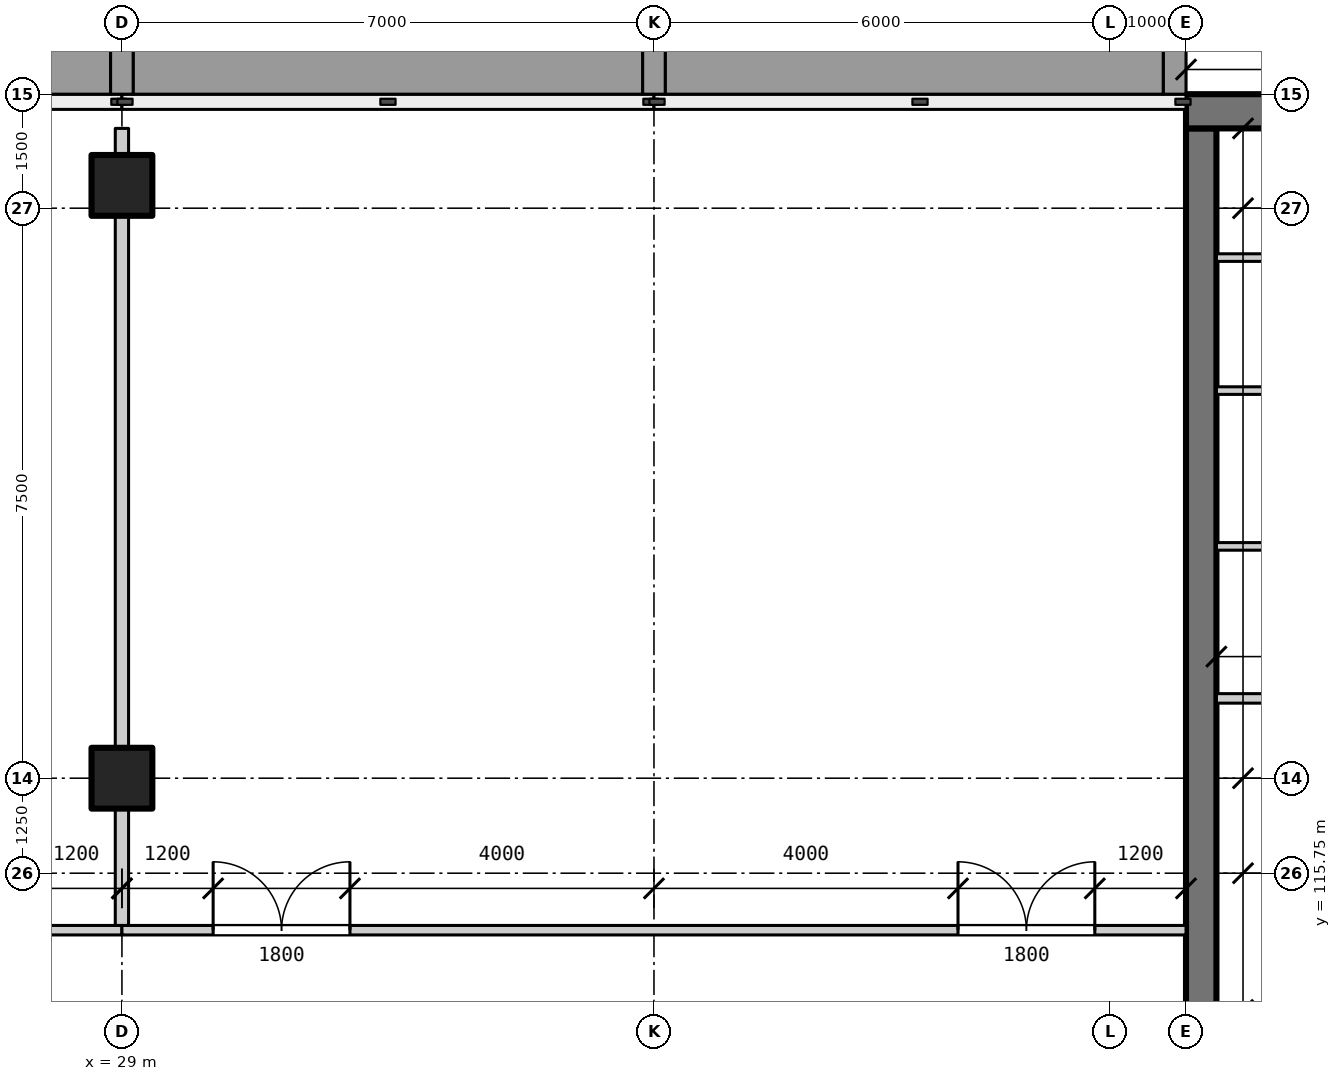
"""IFC4 building model, lengths in metres.
Left out: names, types, materials, properties, quantities, classifications, styles, units other than length and angle.
Written with IfcOpenShell. Run it as: python <this file> out.ifc"""

import sys

from ifc_helpers import new_model, si_unit, direction, frame, frame_2d, origin, origin_2d, place, context, subcontext, project, spatial, rectangle, extrude, element, fill, save


model = new_model("IFC4")
c1 = context("Model", 3, precision=1e-05, world=origin(), true_north=direction((0.0, 1.0)))
c2 = subcontext(c1, "Body", "Model", "MODEL_VIEW")
j1 = project(units=[si_unit("LENGTHUNIT", "METRE"), si_unit("PLANEANGLEUNIT", "RADIAN")], contexts=[c1])
p1 = place(None, origin())
s1 = spatial("IfcSite", under=j1, at=p1, CompositionType="ELEMENT")
p2 = place(p1, origin())
s2 = spatial("IfcBuilding", under=s1, at=p2, CompositionType="ELEMENT")
p3 = place(p2, frame((0.0, 0.0, 6.0)))
s3 = spatial("IfcBuildingStorey", under=s2, at=p3, CompositionType="ELEMENT", Elevation=6.0)
for number, where, z_axis, x_axis in (
    (1, (29.0, 117.0, 0.0), (0.0, 0.0, 1.0), (1.0, 0.0, 0.0)),
    (2, (29.0, 124.8, 0.0), (0.0, 0.0, 1.0), (1.0, 0.0, 0.0)),
):
    element("IfcColumn", number, at=place(p3, frame(where, z_axis=z_axis, x_axis=x_axis)), inside=s3, PredefinedType="COLUMN", context=c2, shape_type="SweptSolid", body=[
        extrude(rectangle(XDim=0.8, YDim=0.8, at=origin_2d()), origin(), (0.0, 0.0, 1.0), 3.9),
    ])
p4 = place(p3, frame((43.2, 99.0, 0.0), z_axis=(0.0, 0.0, 1.0), x_axis=(0.0, 1.0, 0.0)))
e3 = element("IfcWall", 3, at=p4, inside=s3, PredefinedType="SHEAR", context=c2, shape_type="SweptSolid", body=[
    extrude(rectangle(XDim=26.55, YDim=0.4, at=frame_2d((13.275, 0.0))), origin(), (0.0, 0.0, 1.0), 4.2),
])
p5 = place(p4, frame((13.55, 0.0, 0.0)))
e4 = element("IfcOpeningElement", 4, at=p5, cuts=e3, PredefinedType="OPENING", context=c2, shape_type="SweptSolid", body=[
    extrude(rectangle(XDim=1.4, YDim=2.4, at=frame_2d((0.7, 1.2))), frame((0.0, 0.21, 0.0), z_axis=(0.0, -1.0, 0.0), x_axis=(1.0, 0.0, 0.0)), (0.0, 0.0, 1.0), 0.42),
])
p6 = place(p3, frame((43.0, 125.775, 0.0), z_axis=(0.0, 0.0, 1.0), x_axis=(1.0, 0.0, 0.0)))
e5 = element("IfcWall", 5, at=p6, inside=s3, PredefinedType="SOLIDWALL", context=c2, shape_type="SweptSolid", body=[
    extrude(rectangle(XDim=14.55, YDim=0.45, at=frame_2d((7.275, 0.0))), origin(), (0.0, 0.0, 1.0), 3.9),
])
p7 = place(p6, frame((8.35, 0.0, 0.8)))
e6 = element("IfcOpeningElement", 6, at=p7, cuts=e5, PredefinedType="OPENING", context=c2, shape_type="SweptSolid", body=[
    extrude(rectangle(XDim=1.5, YDim=2.2, at=frame_2d((0.75, 1.1))), frame((0.0, 0.235, 0.0), z_axis=(0.0, -1.0, 0.0), x_axis=(1.0, 0.0, 0.0)), (0.0, 0.0, 1.0), 0.47),
])
p8 = place(p6, frame((5.25, 0.0, 0.8)))
e7 = element("IfcOpeningElement", 7, at=p8, cuts=e5, PredefinedType="OPENING", context=c2, shape_type="SweptSolid", body=[
    extrude(rectangle(XDim=1.5, YDim=2.2, at=frame_2d((0.75, 1.1))), frame((0.0, 0.235, 0.0), z_axis=(0.0, -1.0, 0.0), x_axis=(1.0, 0.0, 0.0)), (0.0, 0.0, 1.0), 0.47),
])
p9 = place(p6, frame((1.75, 0.0, 0.8)))
e8 = element("IfcOpeningElement", 8, at=p9, cuts=e5, PredefinedType="OPENING", context=c2, shape_type="SweptSolid", body=[
    extrude(rectangle(XDim=1.5, YDim=2.2, at=frame_2d((0.75, 1.1))), frame((0.0, 0.235, 0.0), z_axis=(0.0, -1.0, 0.0), x_axis=(1.0, 0.0, 0.0)), (0.0, 0.0, 1.0), 0.47),
])
p10 = place(p3, frame((15.0, 115.0, 0.0), z_axis=(0.0, 0.0, 1.0), x_axis=(1.0, 0.0, 0.0)))
e9 = element("IfcWall", 9, at=p10, inside=s3, PredefinedType="PARTITIONING", context=c2, shape_type="SweptSolid", body=[
    extrude(rectangle(XDim=14.0, YDim=0.125, at=frame_2d((7.0, 0.0))), origin(), (0.0, 0.0, 1.0), 3.9),
])
p11 = place(p10, frame((1.2, 0.0, 0.0)))
e10 = element("IfcOpeningElement", 10, at=p11, cuts=e9, PredefinedType="OPENING", context=c2, shape_type="SweptSolid", body=[
    extrude(rectangle(XDim=1.8, YDim=2.1, at=frame_2d((0.9, 1.05))), frame((0.0, 0.073, 0.0), z_axis=(0.0, -1.0, 0.0), x_axis=(1.0, 0.0, 0.0)), (0.0, 0.0, 1.0), 0.145),
])
p12 = place(p10, frame((11.0, 0.0, 0.0)))
e11 = element("IfcOpeningElement", 11, at=p12, cuts=e9, PredefinedType="OPENING", context=c2, shape_type="SweptSolid", body=[
    extrude(rectangle(XDim=1.8, YDim=2.1, at=frame_2d((0.9, 1.05))), frame((0.0, 0.073, 0.0), z_axis=(0.0, -1.0, 0.0), x_axis=(1.0, 0.0, 0.0)), (0.0, 0.0, 1.0), 0.145),
])
p13 = place(p3, frame((29.0, 115.0, 0.0), z_axis=(0.0, 0.0, 1.0), x_axis=(1.0, 0.0, 0.0)))
e12 = element("IfcWall", 12, at=p13, inside=s3, PredefinedType="PARTITIONING", context=c2, shape_type="SweptSolid", body=[
    extrude(rectangle(XDim=14.0, YDim=0.125, at=frame_2d((7.0, 0.0))), origin(), (0.0, 0.0, 1.0), 3.9),
])
p14 = place(p13, frame((1.2, 0.0, 0.0)))
e13 = element("IfcOpeningElement", 13, at=p14, cuts=e12, PredefinedType="OPENING", context=c2, shape_type="SweptSolid", body=[
    extrude(rectangle(XDim=1.8, YDim=2.1, at=frame_2d((0.9, 1.05))), frame((0.0, 0.073, 0.0), z_axis=(0.0, -1.0, 0.0), x_axis=(1.0, 0.0, 0.0)), (0.0, 0.0, 1.0), 0.145),
])
p15 = place(p13, frame((11.0, 0.0, 0.0)))
e14 = element("IfcOpeningElement", 14, at=p15, cuts=e12, PredefinedType="OPENING", context=c2, shape_type="SweptSolid", body=[
    extrude(rectangle(XDim=1.8, YDim=2.1, at=frame_2d((0.9, 1.05))), frame((0.0, 0.073, 0.0), z_axis=(0.0, -1.0, 0.0), x_axis=(1.0, 0.0, 0.0)), (0.0, 0.0, 1.0), 0.145),
])
p16 = place(p3, frame((43.4, 118.05, 0.0), z_axis=(0.0, 0.0, 1.0), x_axis=(1.0, 0.0, 0.0)))
e15 = element("IfcWall", 15, at=p16, inside=s3, PredefinedType="PARTITIONING", context=c2, shape_type="SweptSolid", body=[
    extrude(rectangle(XDim=4.5, YDim=0.125, at=frame_2d((2.25, 0.0))), origin(), (0.0, 0.0, 1.0), 3.9),
])
p17 = place(p16, frame((1.75, 0.0, 0.0)))
e16 = element("IfcOpeningElement", 16, at=p17, cuts=e15, PredefinedType="OPENING", context=c2, shape_type="SweptSolid", body=[
    extrude(rectangle(XDim=1.0, YDim=2.1, at=frame_2d((0.5, 1.05))), frame((0.0, 0.073, 0.0), z_axis=(0.0, -1.0, 0.0), x_axis=(1.0, 0.0, 0.0)), (0.0, 0.0, 1.0), 0.145),
])
p18 = place(p3, frame((43.4, 120.05, 0.0), z_axis=(0.0, 0.0, 1.0), x_axis=(1.0, 0.0, 0.0)))
e17 = element("IfcWall", 17, at=p18, inside=s3, PredefinedType="PARTITIONING", context=c2, shape_type="SweptSolid", body=[
    extrude(rectangle(XDim=2.95, YDim=0.1, at=frame_2d((1.475, 0.0))), origin(), (0.0, 0.0, 1.0), 3.9),
])
for number, where, z_axis, x_axis in (
    (18, (43.4, 122.1, 0.0), (0.0, 0.0, 1.0), (1.0, 0.0, 0.0)),
    (19, (43.4, 123.85, 0.0), (0.0, 0.0, 1.0), (1.0, 0.0, 0.0)),
):
    element("IfcWall", number, at=place(p3, frame(where, z_axis=z_axis, x_axis=x_axis)), inside=s3, PredefinedType="PARTITIONING", context=c2, shape_type="SweptSolid", body=[
        extrude(rectangle(XDim=2.85, YDim=0.1, at=frame_2d((1.425, 0.0))), origin(), (0.0, 0.0, 1.0), 3.9),
    ])
p19 = place(p3, frame((29.0, 115.062, 0.0), z_axis=(0.0, 0.0, 1.0), x_axis=(0.0, 1.0, 0.0)))
e20 = element("IfcWall", 20, at=p19, inside=s3, PredefinedType="PARTITIONING", context=c2, shape_type="SweptSolid", body=[
    extrude(rectangle(XDim=1.538, YDim=0.175, at=frame_2d((0.769, 0.0))), origin(), (0.0, 0.0, 1.0), 2.9),
])
p20 = place(p3, frame((29.0, 117.4, 0.0), z_axis=(0.0, 0.0, 1.0), x_axis=(0.0, 1.0, 0.0)))
e21 = element("IfcWall", 21, at=p20, inside=s3, PredefinedType="PARTITIONING", context=c2, shape_type="SweptSolid", body=[
    extrude(rectangle(XDim=7.0, YDim=0.175, at=frame_2d((3.5, 0.0))), origin(), (0.0, 0.0, 1.0), 2.9),
])
p21 = place(p3, frame((29.0, 125.2, 0.0), z_axis=(0.0, 0.0, 1.0), x_axis=(0.0, 1.0, 0.0)))
e22 = element("IfcWall", 22, at=p21, inside=s3, PredefinedType="PARTITIONING", context=c2, shape_type="SweptSolid", body=[
    extrude(rectangle(XDim=0.35, YDim=0.175, at=frame_2d((0.175, 0.0))), origin(), (0.0, 0.0, 1.0), 3.9),
])
p22 = place(p14, origin())
e23 = element("IfcDoor", 23, at=p22, inside=s3, OperationType="DOUBLE_DOOR_SINGLE_SWING", PredefinedType="DOOR", context=c2, shape_type="SweptSolid", body=[
    extrude(rectangle(XDim=1.8, YDim=2.1, at=frame_2d((0.9, 1.05))), frame((0.0, 0.025, 0.0), z_axis=(0.0, -1.0, 0.0), x_axis=(1.0, 0.0, 0.0)), (0.0, 0.0, 1.0), 0.05),
])
fill(e13, e23)
p23 = place(p15, origin())
e24 = element("IfcDoor", 24, at=p23, inside=s3, OperationType="DOUBLE_DOOR_SINGLE_SWING", PredefinedType="DOOR", context=c2, shape_type="SweptSolid", body=[
    extrude(rectangle(XDim=1.8, YDim=2.1, at=frame_2d((0.9, 1.05))), frame((0.0, 0.025, 0.0), z_axis=(0.0, -1.0, 0.0), x_axis=(1.0, 0.0, 0.0)), (0.0, 0.0, 1.0), 0.05),
])
fill(e14, e24)
save(model, sys.argv[1])
